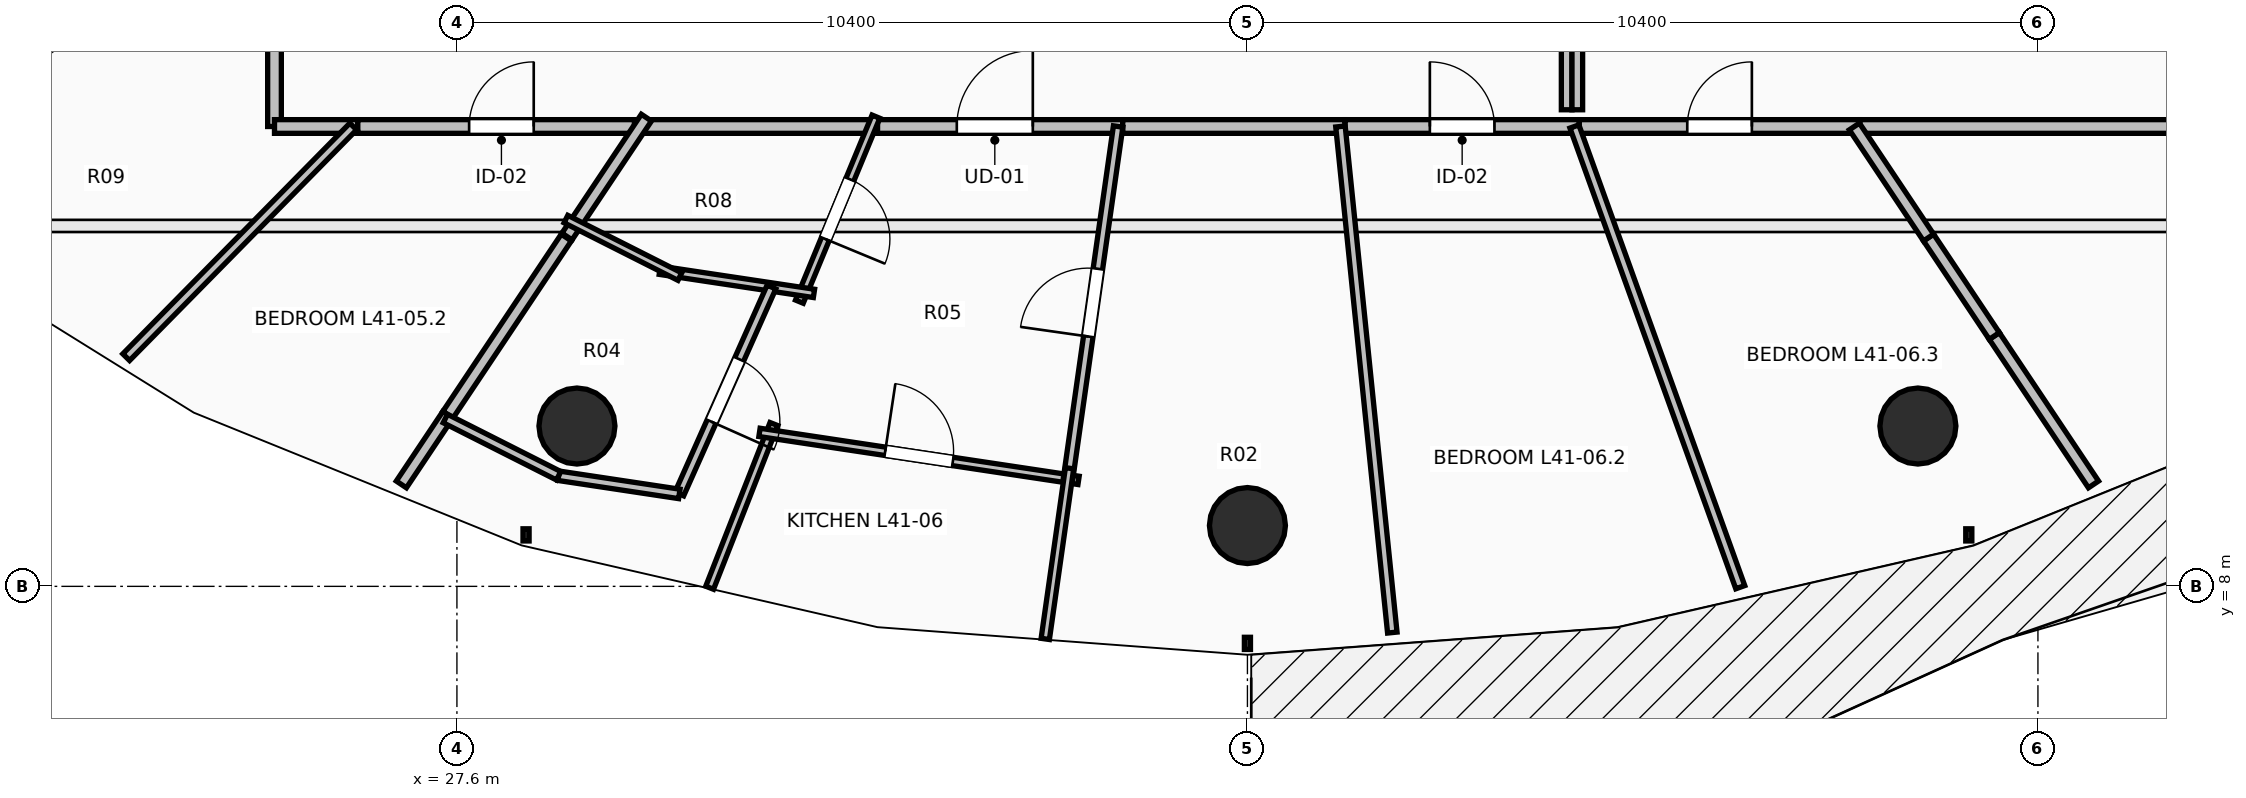
"""IFC4 building model, lengths in metres.
Left out: names, types, materials, properties, quantities, classifications, styles, units other than length and angle.
Written with IfcOpenShell. Run it as: python <this file> out.ifc"""

import sys

from ifc_helpers import new_model, si_unit, direction, frame, frame_2d, origin, origin_2d, place, context, subcontext, project, spatial, rectangle, circle, extrude, element, fill, save


model = new_model("IFC4")
c1 = context("Model", 3, precision=1e-05, world=origin(), true_north=direction((0.0, 1.0)))
c2 = subcontext(c1, "Body", "Model", "MODEL_VIEW")
j1 = project(units=[si_unit("LENGTHUNIT", "METRE"), si_unit("PLANEANGLEUNIT", "RADIAN")], contexts=[c1])
p1 = place(None, origin())
s1 = spatial("IfcSite", under=j1, at=p1, CompositionType="ELEMENT")
p2 = place(p1, origin())
s2 = spatial("IfcBuilding", under=s1, at=p2, CompositionType="ELEMENT")
p3 = place(p2, frame((0.0, 0.0, 153.6)))
s3 = spatial("IfcBuildingStorey", under=s2, at=p3, CompositionType="ELEMENT", Elevation=153.6)
for number, where, z_axis, x_axis in (
    (1, (29.179, 10.109, 0.0), (0.0, 0.0, 1.0), (-0.383, -0.924, 0.0)),
    (2, (38.0, 8.8, 0.0), (0.0, 0.0, 1.0), (0.0, -1.0, 0.0)),
    (3, (46.821, 10.109, 0.0), (0.0, 0.0, 1.0), (0.383, -0.924, 0.0)),
):
    element("IfcColumn", number, at=place(p3, frame(where, z_axis=z_axis, x_axis=x_axis)), inside=s3, PredefinedType="COLUMN", context=c2, shape_type="SweptSolid", body=[
        extrude(circle(Radius=0.5, at=origin_2d()), origin(), (0.0, 0.0, 1.0), 3.5),
    ])
p4 = place(p3, frame((25.2, 17.08, 0.0), z_axis=(0.0, 0.0, 1.0), x_axis=(0.0, -1.0, 0.0)))
e4 = element("IfcWall", 4, at=p4, inside=s3, PredefinedType="PARTITIONING", context=c2, shape_type="SweptSolid", body=[
    extrude(rectangle(XDim=3.03, YDim=0.18, at=frame_2d((1.515, 0.0))), origin(), (0.0, 0.0, 1.0), 2.432),
])
p5 = place(p3, frame((25.2, 14.05, 0.0), z_axis=(0.0, 0.0, 1.0), x_axis=(1.0, 0.0, 0.0)))
e5 = element("IfcWall", 5, at=p5, inside=s3, PredefinedType="PARTITIONING", context=c2, shape_type="SweptSolid", body=[
    extrude(rectangle(XDim=1.096, YDim=0.18, at=frame_2d((0.548, 0.0))), origin(), (0.0, 0.0, 1.0), 2.972),
])
p6 = place(p3, frame((26.296, 14.05, 0.0), z_axis=(0.0, 0.0, 1.0), x_axis=(1.0, 0.0, 0.0)))
e6 = element("IfcWall", 6, at=p6, inside=s3, PredefinedType="PARTITIONING", context=c2, shape_type="SweptSolid", body=[
    extrude(rectangle(XDim=3.779, YDim=0.18, at=frame_2d((1.89, 0.0))), origin(), (0.0, 0.0, 1.0), 2.432),
])
p7 = place(p6, frame((1.465, 0.0, 0.0)))
e7 = element("IfcOpeningElement", 7, at=p7, cuts=e6, PredefinedType="OPENING", context=c2, shape_type="SweptSolid", body=[
    extrude(rectangle(XDim=0.85, YDim=2.1, at=frame_2d((0.425, 1.05))), frame((0.0, 0.105, 0.0), z_axis=(0.0, -1.0, 0.0), x_axis=(1.0, 0.0, 0.0)), (0.0, 0.0, 1.0), 0.21),
])
p8 = place(p3, frame((32.994, 14.05, 0.0), z_axis=(0.0, 0.0, 1.0), x_axis=(1.0, 0.0, 0.0)))
e8 = element("IfcWall", 8, at=p8, inside=s3, PredefinedType="PARTITIONING", context=c2, shape_type="SweptSolid", body=[
    extrude(rectangle(XDim=3.365, YDim=0.18, at=frame_2d((1.683, 0.0))), origin(), (0.0, 0.0, 1.0), 2.886),
])
p9 = place(p8, frame((1.183, 0.0, 0.0)))
e9 = element("IfcOpeningElement", 9, at=p9, cuts=e8, PredefinedType="OPENING", context=c2, shape_type="SweptSolid", body=[
    extrude(rectangle(XDim=1.0, YDim=2.15, at=frame_2d((0.5, 1.075))), frame((0.0, 0.105, 0.0), z_axis=(0.0, -1.0, 0.0), x_axis=(1.0, 0.0, 0.0)), (0.0, 0.0, 1.0), 0.21),
])
p10 = place(p3, frame((29.935, 14.05, 0.0), z_axis=(0.0, 0.0, 1.0), x_axis=(1.0, 0.0, 0.0)))
e10 = element("IfcWall", 10, at=p10, inside=s3, PredefinedType="PARTITIONING", context=c2, shape_type="SweptSolid", body=[
    extrude(rectangle(XDim=3.199, YDim=0.18, at=frame_2d((1.6, 0.0))), origin(), (0.0, 0.0, 1.0), 3.24),
])
p11 = place(p3, frame((36.359, 14.05, 0.0), z_axis=(0.0, 0.0, 1.0), x_axis=(1.0, 0.0, 0.0)))
e11 = element("IfcWall", 11, at=p11, inside=s3, PredefinedType="PARTITIONING", context=c2, shape_type="SweptSolid", body=[
    extrude(rectangle(XDim=2.925, YDim=0.18, at=frame_2d((1.462, 0.0))), origin(), (0.0, 0.0, 1.0), 2.886),
])
p12 = place(p3, frame((39.284, 14.05, 0.0), z_axis=(0.0, 0.0, 1.0), x_axis=(1.0, 0.0, 0.0)))
e12 = element("IfcWall", 12, at=p12, inside=s3, PredefinedType="PARTITIONING", context=c2, shape_type="SweptSolid", body=[
    extrude(rectangle(XDim=3.082, YDim=0.18, at=frame_2d((1.541, 0.0))), origin(), (0.0, 0.0, 1.0), 2.886),
])
p13 = place(p12, frame((1.116, 0.0, 0.0)))
e13 = element("IfcOpeningElement", 13, at=p13, cuts=e12, PredefinedType="OPENING", context=c2, shape_type="SweptSolid", body=[
    extrude(rectangle(XDim=0.85, YDim=2.1, at=frame_2d((0.425, 1.05))), frame((0.0, 0.105, 0.0), z_axis=(0.0, -1.0, 0.0), x_axis=(1.0, 0.0, 0.0)), (0.0, 0.0, 1.0), 0.21),
])
p14 = place(p3, frame((42.366, 14.05, 0.0), z_axis=(0.0, 0.0, 1.0), x_axis=(1.0, 0.0, 0.0)))
e14 = element("IfcWall", 14, at=p14, inside=s3, PredefinedType="PARTITIONING", context=c2, shape_type="SweptSolid", body=[
    extrude(rectangle(XDim=3.691, YDim=0.18, at=frame_2d((1.845, 0.0))), origin(), (0.0, 0.0, 1.0), 2.432),
])
p15 = place(p14, frame((1.42, 0.0, 0.0)))
e15 = element("IfcOpeningElement", 15, at=p15, cuts=e14, PredefinedType="OPENING", context=c2, shape_type="SweptSolid", body=[
    extrude(rectangle(XDim=0.85, YDim=2.1, at=frame_2d((0.425, 1.05))), frame((0.0, 0.105, 0.0), z_axis=(0.0, -1.0, 0.0), x_axis=(1.0, 0.0, 0.0)), (0.0, 0.0, 1.0), 0.21),
])
p16 = place(p3, frame((46.057, 14.05, 0.0), z_axis=(0.0, 0.0, 1.0), x_axis=(1.0, 0.0, 0.0)))
e16 = element("IfcWall", 16, at=p16, inside=s3, PredefinedType="PARTITIONING", context=c2, shape_type="SweptSolid", body=[
    extrude(rectangle(XDim=4.743, YDim=0.18, at=frame_2d((2.372, 0.0))), origin(), (0.0, 0.0, 1.0), 2.432),
])
p17 = place(p3, frame((21.71, 14.741, 0.0), z_axis=(0.0, 0.0, 1.0), x_axis=(0.822672586971, 0.568515448027, 0.0)))
e17 = element("IfcWall", 17, at=p17, inside=s3, PredefinedType="PARTITIONING", context=c2, shape_type="SweptSolid", body=[
    extrude(rectangle(XDim=4.242, YDim=0.125, at=frame_2d((2.121, 0.0))), origin(), (0.0, 0.0, 1.0), 2.432),
])
p18 = place(p17, frame((1.671, 0.0, 0.0)))
e18 = element("IfcOpeningElement", 18, at=p18, cuts=e17, PredefinedType="OPENING", context=c2, shape_type="SweptSolid", body=[
    extrude(rectangle(XDim=0.9, YDim=2.1, at=frame_2d((0.45, 1.05))), frame((0.0, 0.077, 0.0), z_axis=(0.0, -1.0, 0.0), x_axis=(1.0, 0.0, 0.0)), (0.0, 0.0, 1.0), 0.155),
])
p19 = place(p3, frame((23.249, 11.015, 0.0), z_axis=(0.0, 0.0, 1.0), x_axis=(0.701437189486, 0.712731274188, 0.0)))
e19 = element("IfcWall", 19, at=p19, inside=s3, PredefinedType="PARTITIONING", context=c2, shape_type="SweptSolid", body=[
    extrude(rectangle(XDim=4.259, YDim=0.125, at=frame_2d((2.129, 0.0))), origin(), (0.0, 0.0, 1.0), 2.728),
])
p20 = place(p3, frame((26.869, 9.341, 0.0), z_axis=(0.0, 0.0, 1.0), x_axis=(0.555772359104, 0.831334520428, 0.0)))
e20 = element("IfcWall", 20, at=p20, inside=s3, PredefinedType="PARTITIONING", context=c2, shape_type="SweptSolid", body=[
    extrude(rectangle(XDim=1.103, YDim=0.16, at=frame_2d((0.552, 0.0))), origin(), (0.0, 0.0, 1.0), 3.24),
])
p21 = place(p3, frame((29.048, 12.603, 0.0), z_axis=(0.0, 0.0, 1.0), x_axis=(0.555448864434, 0.831550695387, 0.0)))
e21 = element("IfcWall", 21, at=p21, inside=s3, PredefinedType="PARTITIONING", context=c2, shape_type="SweptSolid", body=[
    extrude(rectangle(XDim=1.881, YDim=0.16, at=frame_2d((0.94, 0.0))), origin(), (0.0, 0.0, 1.0), 2.886),
])
p22 = place(p3, frame((27.482, 10.258, 0.0), z_axis=(0.0, 0.0, 1.0), x_axis=(0.5554636799, 0.831540798946, 0.0)))
e22 = element("IfcWall", 22, at=p22, inside=s3, PredefinedType="PARTITIONING", context=c2, shape_type="SweptSolid", body=[
    extrude(rectangle(XDim=2.803, YDim=0.16, at=frame_2d((1.402, 0.0))), origin(), (0.0, 0.0, 1.0), 2.432),
])
p23 = place(p3, frame((33.113, 14.179, 0.0), z_axis=(0.0, 0.0, 1.0), x_axis=(-0.382343605935, -0.924020220017, 0.0)))
e23 = element("IfcWall", 23, at=p23, inside=s3, PredefinedType="PARTITIONING", context=c2, shape_type="SweptSolid", body=[
    extrude(rectangle(XDim=2.634, YDim=0.11, at=frame_2d((1.317, 0.0))), origin(), (0.0, 0.0, 1.0), 2.886),
])
p24 = place(p23, frame((0.892, 0.0, 0.0)))
e24 = element("IfcOpeningElement", 24, at=p24, cuts=e23, PredefinedType="OPENING", context=c2, shape_type="SweptSolid", body=[
    extrude(rectangle(XDim=0.85, YDim=2.1, at=frame_2d((0.425, 1.05))), frame((0.0, 0.07, 0.0), z_axis=(0.0, -1.0, 0.0), x_axis=(1.0, 0.0, 0.0)), (0.0, 0.0, 1.0), 0.14),
])
p25 = place(p3, frame((32.297, 11.854, 0.0), z_axis=(0.0, 0.0, 1.0), x_axis=(-0.988917131865, 0.148468536412, 0.0)))
e25 = element("IfcWall", 25, at=p25, inside=s3, PredefinedType="PARTITIONING", context=c2, shape_type="SweptSolid", body=[
    extrude(rectangle(XDim=2.051, YDim=0.11, at=frame_2d((1.025, 0.0))), origin(), (0.0, 0.0, 1.0), 3.24),
])
p26 = place(p3, frame((30.925, 7.982, 0.0), z_axis=(0.0, 0.0, 1.0), x_axis=(0.365433616255, 0.930837403691, 0.0)))
e26 = element("IfcWall", 26, at=p26, inside=s3, PredefinedType="PARTITIONING", context=c2, shape_type="SweptSolid", body=[
    extrude(rectangle(XDim=2.313, YDim=0.11, at=frame_2d((1.157, 0.0))), origin(), (0.0, 0.0, 1.0), 2.728),
])
p27 = place(p3, frame((31.581, 10.026, 0.0), z_axis=(0.0, 0.0, 1.0), x_axis=(0.988869600434, -0.148784788666, 0.0)))
e27 = element("IfcWall", 27, at=p27, inside=s3, PredefinedType="PARTITIONING", context=c2, shape_type="SweptSolid", body=[
    extrude(rectangle(XDim=4.245, YDim=0.11, at=frame_2d((2.123, 0.0))), origin(), (0.0, 0.0, 1.0), 3.24),
])
p28 = place(p27, frame((1.673, 0.0, 0.0)))
e28 = element("IfcOpeningElement", 28, at=p28, cuts=e27, PredefinedType="OPENING", context=c2, shape_type="SweptSolid", body=[
    extrude(rectangle(XDim=0.9, YDim=2.1, at=frame_2d((0.45, 1.05))), frame((0.0, 0.07, 0.0), z_axis=(0.0, -1.0, 0.0), x_axis=(1.0, 0.0, 0.0)), (0.0, 0.0, 1.0), 0.14),
])
p29 = place(p3, frame((31.738, 11.938, 0.0), z_axis=(0.0, 0.0, 1.0), x_axis=(-0.406814964782, -0.913510582549, 0.0)))
e29 = element("IfcWall", 29, at=p29, inside=s3, PredefinedType="PARTITIONING", context=c2, shape_type="SweptSolid", body=[
    extrude(rectangle(XDim=2.98, YDim=0.125, at=frame_2d((1.49, 0.0))), origin(), (0.0, 0.0, 1.0), 2.728),
])
p30 = place(p29, frame((1.04, 0.0, 0.0)))
e30 = element("IfcOpeningElement", 30, at=p30, cuts=e29, PredefinedType="OPENING", context=c2, shape_type="SweptSolid", body=[
    extrude(rectangle(XDim=0.9, YDim=2.1, at=frame_2d((0.45, 1.05))), frame((0.0, 0.077, 0.0), z_axis=(0.0, -1.0, 0.0), x_axis=(1.0, 0.0, 0.0)), (0.0, 0.0, 1.0), 0.155),
])
p31 = place(p3, frame((30.526, 9.216, 0.0), z_axis=(0.0, 0.0, 1.0), x_axis=(-0.988860390109, 0.148845990455, 0.0)))
e31 = element("IfcWall", 31, at=p31, inside=s3, PredefinedType="PARTITIONING", context=c2, shape_type="SweptSolid", body=[
    extrude(rectangle(XDim=1.606, YDim=0.125, at=frame_2d((0.803, 0.0))), origin(), (0.0, 0.0, 1.0), 3.24),
])
p32 = place(p3, frame((28.938, 9.455, 0.0), z_axis=(0.0, 0.0, 1.0), x_axis=(-0.892517956507, 0.451011859392, 0.0)))
e32 = element("IfcWall", 32, at=p32, inside=s3, PredefinedType="PARTITIONING", context=c2, shape_type="SweptSolid", body=[
    extrude(rectangle(XDim=1.669, YDim=0.125, at=frame_2d((0.835, 0.0))), origin(), (0.0, 0.0, 1.0), 3.24),
])
p33 = place(p3, frame((35.64, 9.415, 0.0), z_axis=(0.0, 0.0, 1.0), x_axis=(0.140800762129, 0.990037951487, 0.0)))
e33 = element("IfcWall", 33, at=p33, inside=s3, PredefinedType="PARTITIONING", context=c2, shape_type="SweptSolid", body=[
    extrude(rectangle(XDim=4.682, YDim=0.125, at=frame_2d((2.341, 0.0))), origin(), (0.0, 0.0, 1.0), 2.886),
])
p34 = place(p33, frame((1.891, 0.0, 0.0)))
e34 = element("IfcOpeningElement", 34, at=p34, cuts=e33, PredefinedType="OPENING", context=c2, shape_type="SweptSolid", body=[
    extrude(rectangle(XDim=0.9, YDim=2.1, at=frame_2d((0.45, 1.05))), frame((0.0, 0.077, 0.0), z_axis=(0.0, -1.0, 0.0), x_axis=(1.0, 0.0, 0.0)), (0.0, 0.0, 1.0), 0.155),
])
p35 = place(p3, frame((29.034, 12.832, 0.0), z_axis=(0.0, 0.0, 1.0), x_axis=(0.892617244745, -0.450815321816, 0.0)))
e35 = element("IfcWall", 35, at=p35, inside=s3, PredefinedType="PARTITIONING", context=c2, shape_type="SweptSolid", body=[
    extrude(rectangle(XDim=1.679, YDim=0.11, at=frame_2d((0.84, 0.0))), origin(), (0.0, 0.0, 1.0), 2.972),
])
p36 = place(p3, frame((35.34, 7.308, 0.0), z_axis=(0.0, 0.0, 1.0), x_axis=(0.140803429846, 0.990037572087, 0.0)))
e36 = element("IfcWall", 36, at=p36, inside=s3, PredefinedType="PARTITIONING", context=c2, shape_type="SweptSolid", body=[
    extrude(rectangle(XDim=2.268, YDim=0.11, at=frame_2d((1.134, 0.0))), origin(), (0.0, 0.0, 1.0), 2.728),
])
p37 = place(p3, frame((39.906, 7.392, 0.0), z_axis=(0.0, 0.0, 1.0), x_axis=(-0.101883545041, 0.994796332547, 0.0)))
e37 = element("IfcWall", 37, at=p37, inside=s3, PredefinedType="PARTITIONING", context=c2, shape_type="SweptSolid", body=[
    extrude(rectangle(XDim=6.693, YDim=0.125, at=frame_2d((3.346, 0.0))), origin(), (0.0, 0.0, 1.0), 2.432),
])
p38 = place(p3, frame((44.484, 7.989, 0.0), z_axis=(0.0, 0.0, 1.0), x_axis=(-0.338707389808, 0.940891760028, 0.0)))
e38 = element("IfcWall", 38, at=p38, inside=s3, PredefinedType="PARTITIONING", context=c2, shape_type="SweptSolid", body=[
    extrude(rectangle(XDim=6.442, YDim=0.125, at=frame_2d((3.221, 0.0))), origin(), (0.0, 0.0, 1.0), 2.432),
])
p39 = place(p3, frame((49.131, 9.341, 0.0), z_axis=(0.0, 0.0, 1.0), x_axis=(-0.555659266741, 0.831410114976, 0.0)))
e39 = element("IfcWall", 39, at=p39, inside=s3, PredefinedType="PARTITIONING", context=c2, shape_type="SweptSolid", body=[
    extrude(rectangle(XDim=2.349, YDim=0.16, at=frame_2d((1.174, 0.0))), origin(), (0.0, 0.0, 1.0), 2.728),
])
p40 = place(p3, frame((47.826, 11.294, 0.0), z_axis=(0.0, 0.0, 1.0), x_axis=(-0.55538732275, 0.831591799941, 0.0)))
e40 = element("IfcWall", 40, at=p40, inside=s3, PredefinedType="PARTITIONING", context=c2, shape_type="SweptSolid", body=[
    extrude(rectangle(XDim=1.557, YDim=0.16, at=frame_2d((0.779, 0.0))), origin(), (0.0, 0.0, 1.0), 2.432),
])
p41 = place(p3, frame((46.961, 12.589, 0.0), z_axis=(0.0, 0.0, 1.0), x_axis=(-0.555437554373, 0.83155825003, 0.0)))
e41 = element("IfcWall", 41, at=p41, inside=s3, PredefinedType="PARTITIONING", context=c2, shape_type="SweptSolid", body=[
    extrude(rectangle(XDim=1.757, YDim=0.16, at=frame_2d((0.878, 0.0))), origin(), (0.0, 0.0, 1.0), 2.886),
])
for number, where, z_axis, x_axis in (
    (42, (42.2, 16.1, 0.0), (0.0, 0.0, 1.0), (0.0, -1.0, 0.0)),
    (43, (42.34, 14.27, 0.0), (0.0, 0.0, 1.0), (0.0, 1.0, 0.0)),
):
    element("IfcWall", number, at=place(p3, frame(where, z_axis=z_axis, x_axis=x_axis)), inside=s3, PredefinedType="PARTITIONING", context=c2, shape_type="SweptSolid", body=[
        extrude(rectangle(XDim=1.83, YDim=0.14, at=frame_2d((0.915, 0.0))), origin(), (0.0, 0.0, 1.0), 2.886),
    ])
p42 = place(p9, origin())
e44 = element("IfcDoor", 44, at=p42, inside=s3, OperationType="SINGLE_SWING_RIGHT", PredefinedType="DOOR", context=c2, shape_type="SweptSolid", body=[
    extrude(rectangle(XDim=1.0, YDim=2.15, at=frame_2d((0.5, 1.075))), frame((0.0, 0.025, 0.0), z_axis=(0.0, -1.0, 0.0), x_axis=(1.0, 0.0, 0.0)), (0.0, 0.0, 1.0), 0.05),
])
fill(e9, e44)
p43 = place(p24, origin())
e45 = element("IfcDoor", 45, at=p43, inside=s3, OperationType="SINGLE_SWING_RIGHT", PredefinedType="DOOR", context=c2, shape_type="SweptSolid", body=[
    extrude(rectangle(XDim=0.85, YDim=2.1, at=frame_2d((0.425, 1.05))), frame((0.0, 0.025, 0.0), z_axis=(0.0, -1.0, 0.0), x_axis=(1.0, 0.0, 0.0)), (0.0, 0.0, 1.0), 0.05),
])
fill(e24, e45)
p44 = place(p28, origin())
e46 = element("IfcDoor", 46, at=p44, inside=s3, OperationType="SINGLE_SWING_LEFT", PredefinedType="DOOR", context=c2, shape_type="SweptSolid", body=[
    extrude(rectangle(XDim=0.9, YDim=2.1, at=frame_2d((0.45, 1.05))), frame((0.0, 0.025, 0.0), z_axis=(0.0, -1.0, 0.0), x_axis=(1.0, 0.0, 0.0)), (0.0, 0.0, 1.0), 0.05),
])
fill(e28, e46)
p45 = place(p30, origin())
e47 = element("IfcDoor", 47, at=p45, inside=s3, OperationType="SINGLE_SWING_RIGHT", PredefinedType="DOOR", context=c2, shape_type="SweptSolid", body=[
    extrude(rectangle(XDim=0.9, YDim=2.1, at=frame_2d((0.45, 1.05))), frame((0.0, 0.025, 0.0), z_axis=(0.0, -1.0, 0.0), x_axis=(1.0, 0.0, 0.0)), (0.0, 0.0, 1.0), 0.05),
])
fill(e30, e47)
p46 = place(p34, origin())
e48 = element("IfcDoor", 48, at=p46, inside=s3, OperationType="SINGLE_SWING_LEFT", PredefinedType="DOOR", context=c2, shape_type="SweptSolid", body=[
    extrude(rectangle(XDim=0.9, YDim=2.1, at=frame_2d((0.45, 1.05))), frame((0.0, 0.025, 0.0), z_axis=(0.0, -1.0, 0.0), x_axis=(1.0, 0.0, 0.0)), (0.0, 0.0, 1.0), 0.05),
])
fill(e34, e48)
p47 = place(p7, origin())
e49 = element("IfcDoor", 49, at=p47, inside=s3, OperationType="SINGLE_SWING_RIGHT", PredefinedType="DOOR", context=c2, shape_type="SweptSolid", body=[
    extrude(rectangle(XDim=0.85, YDim=2.1, at=frame_2d((0.425, 1.05))), frame((0.0, 0.025, 0.0), z_axis=(0.0, -1.0, 0.0), x_axis=(1.0, 0.0, 0.0)), (0.0, 0.0, 1.0), 0.05),
])
fill(e7, e49)
p48 = place(p13, origin())
e50 = element("IfcDoor", 50, at=p48, inside=s3, OperationType="SINGLE_SWING_LEFT", PredefinedType="DOOR", context=c2, shape_type="SweptSolid", body=[
    extrude(rectangle(XDim=0.85, YDim=2.1, at=frame_2d((0.425, 1.05))), frame((0.0, 0.025, 0.0), z_axis=(0.0, -1.0, 0.0), x_axis=(1.0, 0.0, 0.0)), (0.0, 0.0, 1.0), 0.05),
])
fill(e13, e50)
p49 = place(p15, origin())
e51 = element("IfcDoor", 51, at=p49, inside=s3, OperationType="SINGLE_SWING_RIGHT", PredefinedType="DOOR", context=c2, shape_type="SweptSolid", body=[
    extrude(rectangle(XDim=0.85, YDim=2.1, at=frame_2d((0.425, 1.05))), frame((0.0, 0.025, 0.0), z_axis=(0.0, -1.0, 0.0), x_axis=(1.0, 0.0, 0.0)), (0.0, 0.0, 1.0), 0.05),
])
fill(e15, e51)
save(model, sys.argv[1])
